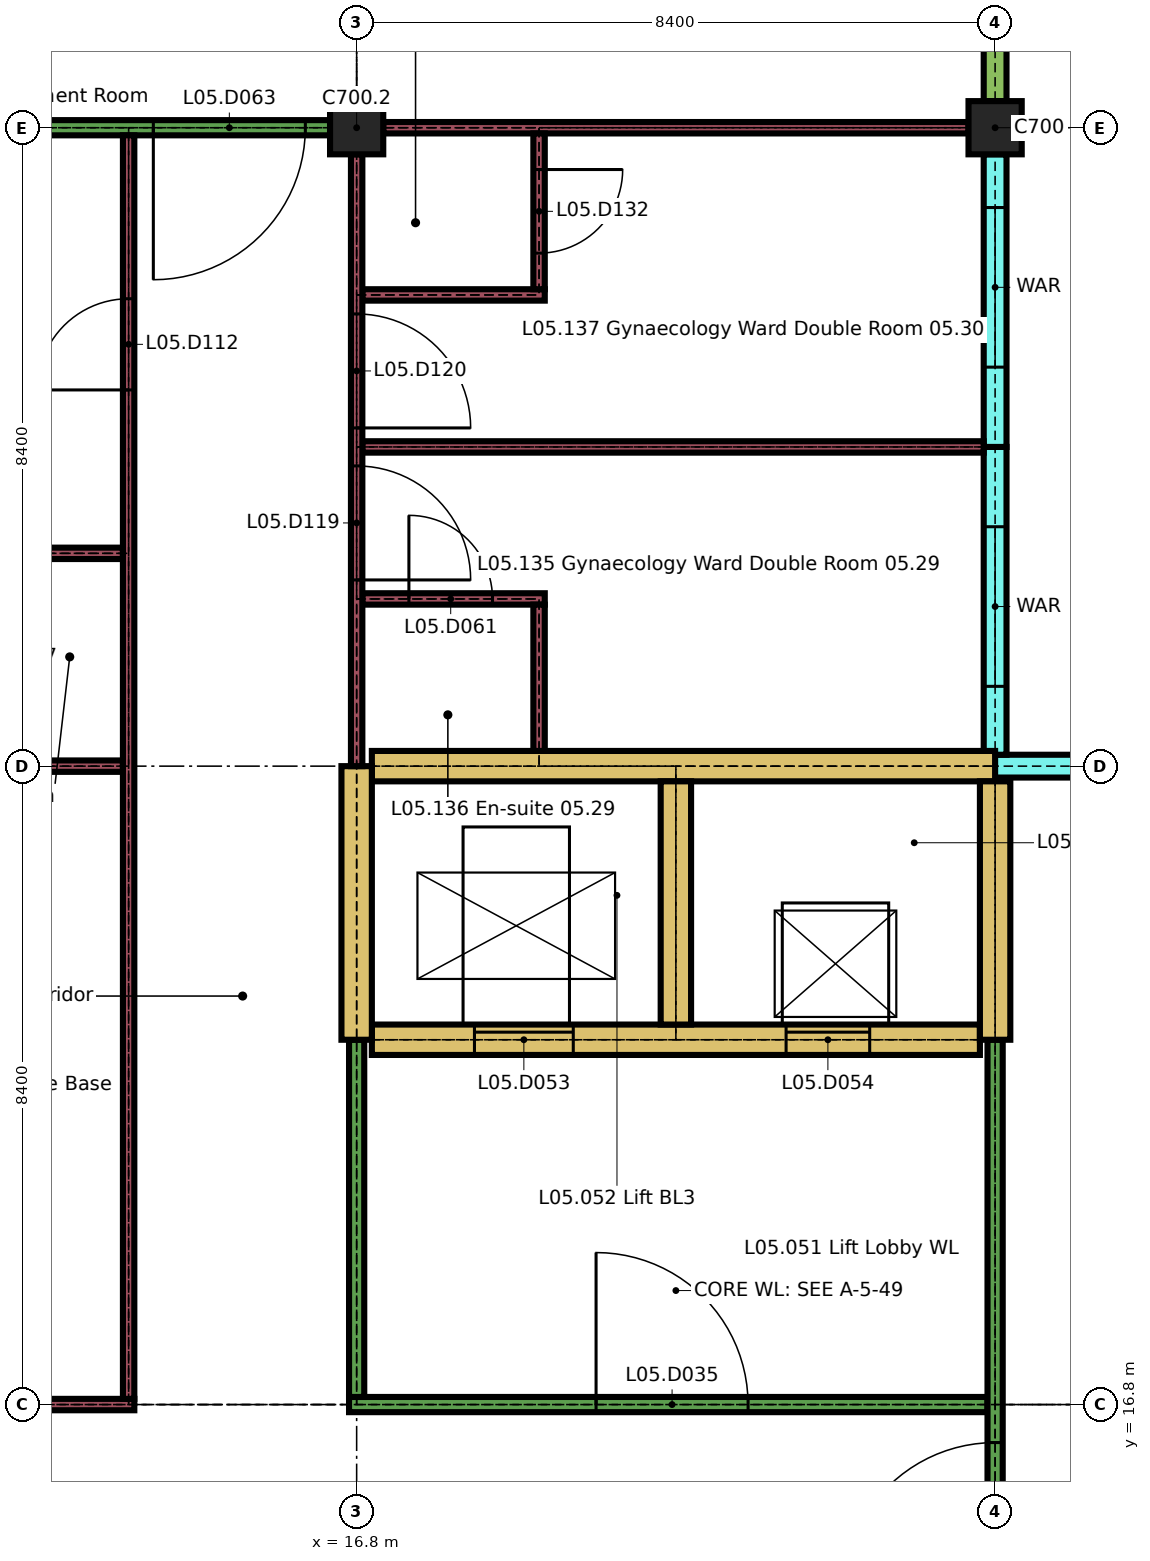
"""IFC4 building model, lengths in metres.
Left out: names, types, materials, properties, quantities, classifications, styles, units other than length and angle.
Written with IfcOpenShell. Run it as: python <this file> out.ifc"""

import sys

from ifc_helpers import new_model, si_unit, direction, frame, frame_2d, origin, origin_2d, place, context, subcontext, project, spatial, rectangle, extrude, element, fill, save


model = new_model("IFC4")
c1 = context("Model", 3, precision=1e-05, world=origin(), true_north=direction((0.0, 1.0)))
c2 = subcontext(c1, "Body", "Model", "MODEL_VIEW")
j1 = project(units=[si_unit("LENGTHUNIT", "METRE"), si_unit("PLANEANGLEUNIT", "RADIAN")], contexts=[c1])
p1 = place(None, origin())
s1 = spatial("IfcSite", under=j1, at=p1, CompositionType="ELEMENT")
p2 = place(p1, origin())
s2 = spatial("IfcBuilding", under=s1, at=p2, CompositionType="ELEMENT")
p3 = place(p2, frame((0.0, 0.0, 22.5)))
s3 = spatial("IfcBuildingStorey", under=s2, at=p3, CompositionType="ELEMENT", Elevation=22.5)
for number, where, z_axis, x_axis in (
    (1, (16.8, 33.6, 0.0), (0.0, 0.0, 1.0), (1.0, 0.0, 0.0)),
    (2, (25.2, 33.6, 0.0), (0.0, 0.0, 1.0), (1.0, 0.0, 0.0)),
):
    element("IfcColumn", number, at=place(p3, frame(where, z_axis=z_axis, x_axis=x_axis)), inside=s3, PredefinedType="COLUMN", context=c2, shape_type="SweptSolid", body=[
        extrude(rectangle(XDim=0.7, YDim=0.7, at=origin_2d()), origin(), (0.0, 0.0, 1.0), 3.26),
    ])
p4 = place(p3, frame((25.05, 25.2, 0.0), z_axis=(0.0, 0.0, 1.0), x_axis=(1.0, 0.0, 0.0)))
e3 = element("IfcWall", 3, at=p4, inside=s3, PredefinedType="SOLIDWALL", context=c2, shape_type="SweptSolid", body=[
    extrude(rectangle(XDim=1.45, YDim=0.3, at=frame_2d((0.725, 0.0))), origin(), (0.0, 0.0, 1.0), 3.26),
])
p5 = place(p3, frame((25.2, 25.35, 0.0), z_axis=(0.0, 0.0, 1.0), x_axis=(0.0, 1.0, 0.0)))
e4 = element("IfcWall", 4, at=p5, inside=s3, PredefinedType="SOLIDWALL", context=c2, shape_type="SweptSolid", body=[
    extrude(rectangle(XDim=4.05, YDim=0.3, at=frame_2d((2.025, 0.0))), origin(), (0.0, 0.0, 1.0), 3.26),
])
p6 = place(p5, frame((0.9, 0.0, 0.9)))
e5 = element("IfcOpeningElement", 5, at=p6, cuts=e4, PredefinedType="OPENING", context=c2, shape_type="SweptSolid", body=[
    extrude(rectangle(XDim=2.1, YDim=1.5, at=frame_2d((1.05, 0.75))), frame((0.0, 0.16, 0.0), z_axis=(0.0, -1.0, 0.0), x_axis=(1.0, 0.0, 0.0)), (0.0, 0.0, 1.0), 0.32),
])
p7 = place(p3, frame((25.2, 29.4, 0.0), z_axis=(0.0, 0.0, 1.0), x_axis=(0.0, 1.0, 0.0)))
e6 = element("IfcWall", 6, at=p7, inside=s3, PredefinedType="SOLIDWALL", context=c2, shape_type="SweptSolid", body=[
    extrude(rectangle(XDim=3.85, YDim=0.3, at=frame_2d((1.925, 0.0))), origin(), (0.0, 0.0, 1.0), 3.26),
])
p8 = place(p7, frame((1.05, 0.0, 0.9)))
e7 = element("IfcOpeningElement", 7, at=p8, cuts=e6, PredefinedType="OPENING", context=c2, shape_type="SweptSolid", body=[
    extrude(rectangle(XDim=2.1, YDim=1.5, at=frame_2d((1.05, 0.75))), frame((0.0, 0.16, 0.0), z_axis=(0.0, -1.0, 0.0), x_axis=(1.0, 0.0, 0.0)), (0.0, 0.0, 1.0), 0.32),
])
p9 = place(p3, frame((25.2, 33.95, 0.0), z_axis=(0.0, 0.0, 1.0), x_axis=(0.0, 1.0, 0.0)))
e8 = element("IfcWall", 8, at=p9, inside=s3, PredefinedType="SOLIDWALL", context=c2, shape_type="SweptSolid", body=[
    extrude(rectangle(XDim=1.15, YDim=0.3, at=frame_2d((0.575, 0.0))), origin(), (0.0, 0.0, 1.0), 2.96),
])
p10 = place(p3, frame((11.4, 16.8, 0.0), z_axis=(0.0, 0.0, 1.0), x_axis=(1.0, 0.0, 0.0)))
e9 = element("IfcWall", 9, at=p10, inside=s3, PredefinedType="PARTITIONING", context=c2, shape_type="SweptSolid", body=[
    extrude(rectangle(XDim=2.475, YDim=0.15, at=frame_2d((1.238, 0.0))), origin(), (0.0, 0.0, 1.0), 3.26),
])
p11 = place(p3, frame((16.7, 16.8, 0.0), z_axis=(0.0, 0.0, 1.0), x_axis=(1.0, 0.0, 0.0)))
e10 = element("IfcWall", 10, at=p11, inside=s3, PredefinedType="PARTITIONING", context=c2, shape_type="SweptSolid", body=[
    extrude(rectangle(XDim=8.4, YDim=0.2, at=frame_2d((4.2, 0.0))), origin(), (0.0, 0.0, 1.0), 3.26),
])
p12 = place(p11, frame((3.25, 0.0, 0.0)))
e11 = element("IfcOpeningElement", 11, at=p12, cuts=e10, PredefinedType="OPENING", context=c2, shape_type="SweptSolid", body=[
    extrude(rectangle(XDim=2.0, YDim=2.4, at=frame_2d((1.0, 1.2))), frame((0.0, 0.11, 0.0), z_axis=(0.0, -1.0, 0.0), x_axis=(1.0, 0.0, 0.0)), (0.0, 0.0, 1.0), 0.22),
])
p13 = place(p3, frame((17.0, 21.6, 0.0), z_axis=(0.0, 0.0, 1.0), x_axis=(1.0, 0.0, 0.0)))
e12 = element("IfcWall", 12, at=p13, inside=s3, PredefinedType="SHEAR", context=c2, shape_type="SweptSolid", body=[
    extrude(rectangle(XDim=8.0, YDim=0.4, at=frame_2d((4.0, 0.0))), origin(), (0.0, 0.0, 1.0), 3.26),
])
p14 = place(p13, frame((1.35, 0.0, 0.0)))
e13 = element("IfcOpeningElement", 13, at=p14, cuts=e12, PredefinedType="OPENING", context=c2, shape_type="SweptSolid", body=[
    extrude(rectangle(XDim=1.3, YDim=2.1, at=frame_2d((0.65, 1.05))), frame((0.0, 0.21, 0.0), z_axis=(0.0, -1.0, 0.0), x_axis=(1.0, 0.0, 0.0)), (0.0, 0.0, 1.0), 0.42),
])
p15 = place(p13, frame((5.45, 0.0, 0.0)))
e14 = element("IfcOpeningElement", 14, at=p15, cuts=e12, PredefinedType="OPENING", context=c2, shape_type="SweptSolid", body=[
    extrude(rectangle(XDim=1.1, YDim=2.1, at=frame_2d((0.55, 1.05))), frame((0.0, 0.21, 0.0), z_axis=(0.0, -1.0, 0.0), x_axis=(1.0, 0.0, 0.0)), (0.0, 0.0, 1.0), 0.42),
])
p16 = place(p3, frame((11.325, 25.2, 0.0), z_axis=(0.0, 0.0, 1.0), x_axis=(1.0, 0.0, 0.0)))
e15 = element("IfcWall", 15, at=p16, inside=s3, PredefinedType="PARTITIONING", context=c2, shape_type="SweptSolid", body=[
    extrude(rectangle(XDim=2.4, YDim=0.15, at=frame_2d((1.2, 0.0))), origin(), (0.0, 0.0, 1.0), 3.26),
])
p17 = place(p3, frame((17.0, 25.2, 0.0), z_axis=(0.0, 0.0, 1.0), x_axis=(1.0, 0.0, 0.0)))
e16 = element("IfcWall", 16, at=p17, inside=s3, PredefinedType="SHEAR", context=c2, shape_type="SweptSolid", body=[
    extrude(rectangle(XDim=8.2, YDim=0.4, at=frame_2d((4.1, 0.0))), origin(), (0.0, 0.0, 1.0), 3.26),
])
p18 = place(p3, frame((16.875, 27.4, 0.0), z_axis=(0.0, 0.0, 1.0), x_axis=(1.0, 0.0, 0.0)))
e17 = element("IfcWall", 17, at=p18, inside=s3, PredefinedType="PARTITIONING", context=c2, shape_type="SweptSolid", body=[
    extrude(rectangle(XDim=2.4, YDim=0.15, at=frame_2d((1.2, 0.0))), origin(), (0.0, 0.0, 1.0), 3.26),
])
p19 = place(p18, frame((0.613, 0.0, 0.0)))
e18 = element("IfcOpeningElement", 18, at=p19, cuts=e17, PredefinedType="OPENING", context=c2, shape_type="SweptSolid", body=[
    extrude(rectangle(XDim=1.1, YDim=2.1, at=frame_2d((0.55, 1.05))), frame((0.0, 0.085, 0.0), z_axis=(0.0, -1.0, 0.0), x_axis=(1.0, 0.0, 0.0)), (0.0, 0.0, 1.0), 0.17),
])
p20 = place(p3, frame((11.475, 28.0, 0.0), z_axis=(0.0, 0.0, 1.0), x_axis=(1.0, 0.0, 0.0)))
e19 = element("IfcWall", 19, at=p20, inside=s3, PredefinedType="PARTITIONING", context=c2, shape_type="SweptSolid", body=[
    extrude(rectangle(XDim=2.25, YDim=0.15, at=frame_2d((1.125, 0.0))), origin(), (0.0, 0.0, 1.0), 3.26),
])
p21 = place(p3, frame((16.875, 29.4, 0.0), z_axis=(0.0, 0.0, 1.0), x_axis=(1.0, 0.0, 0.0)))
e20 = element("IfcWall", 20, at=p21, inside=s3, PredefinedType="PARTITIONING", context=c2, shape_type="SweptSolid", body=[
    extrude(rectangle(XDim=8.175, YDim=0.15, at=frame_2d((4.087, 0.0))), origin(), (0.0, 0.0, 1.0), 3.26),
])
p22 = place(p3, frame((16.875, 31.4, 0.0), z_axis=(0.0, 0.0, 1.0), x_axis=(1.0, 0.0, 0.0)))
e21 = element("IfcWall", 21, at=p22, inside=s3, PredefinedType="PARTITIONING", context=c2, shape_type="SweptSolid", body=[
    extrude(rectangle(XDim=2.4, YDim=0.15, at=frame_2d((1.2, 0.0))), origin(), (0.0, 0.0, 1.0), 3.26),
])
p23 = place(p3, frame((8.75, 33.6, 0.0), z_axis=(0.0, 0.0, 1.0), x_axis=(1.0, 0.0, 0.0)))
e22 = element("IfcWall", 22, at=p23, inside=s3, PredefinedType="PARTITIONING", context=c2, shape_type="SweptSolid", body=[
    extrude(rectangle(XDim=7.7, YDim=0.2, at=frame_2d((3.85, 0.0))), origin(), (0.0, 0.0, 1.0), 3.26),
])
p24 = place(p23, frame((0.325, 0.0, 0.0)))
e23 = element("IfcOpeningElement", 23, at=p24, cuts=e22, PredefinedType="OPENING", context=c2, shape_type="SweptSolid", body=[
    extrude(rectangle(XDim=2.0, YDim=2.4, at=frame_2d((1.0, 1.2))), frame((0.0, 0.11, 0.0), z_axis=(0.0, -1.0, 0.0), x_axis=(1.0, 0.0, 0.0)), (0.0, 0.0, 1.0), 0.22),
])
p25 = place(p23, frame((5.375, 0.0, 0.0)))
e24 = element("IfcOpeningElement", 24, at=p25, cuts=e22, PredefinedType="OPENING", context=c2, shape_type="SweptSolid", body=[
    extrude(rectangle(XDim=2.0, YDim=2.4, at=frame_2d((1.0, 1.2))), frame((0.0, 0.11, 0.0), z_axis=(0.0, -1.0, 0.0), x_axis=(1.0, 0.0, 0.0)), (0.0, 0.0, 1.0), 0.22),
])
p26 = place(p3, frame((17.15, 33.6, 0.0), z_axis=(0.0, 0.0, 1.0), x_axis=(1.0, 0.0, 0.0)))
e25 = element("IfcWall", 25, at=p26, inside=s3, PredefinedType="PARTITIONING", context=c2, shape_type="SweptSolid", body=[
    extrude(rectangle(XDim=7.7, YDim=0.15, at=frame_2d((3.85, 0.0))), origin(), (0.0, 0.0, 1.0), 3.26),
])
p27 = place(p3, frame((13.8, 16.875, 0.0), z_axis=(0.0, 0.0, 1.0), x_axis=(0.0, 1.0, 0.0)))
e26 = element("IfcWall", 26, at=p27, inside=s3, PredefinedType="PARTITIONING", context=c2, shape_type="SweptSolid", body=[
    extrude(rectangle(XDim=16.625, YDim=0.15, at=frame_2d((8.312, 0.0))), origin(), (0.0, 0.0, 1.0), 3.26),
])
p28 = place(p27, frame((13.275, 0.0, 0.0)))
e27 = element("IfcOpeningElement", 27, at=p28, cuts=e26, PredefinedType="OPENING", context=c2, shape_type="SweptSolid", body=[
    extrude(rectangle(XDim=1.2, YDim=2.1, at=frame_2d((0.6, 1.05))), frame((0.0, 0.085, 0.0), z_axis=(0.0, -1.0, 0.0), x_axis=(1.0, 0.0, 0.0)), (0.0, 0.0, 1.0), 0.17),
])
p29 = place(p3, frame((16.8, 16.9, 0.0), z_axis=(0.0, 0.0, 1.0), x_axis=(0.0, 1.0, 0.0)))
e28 = element("IfcWall", 28, at=p29, inside=s3, PredefinedType="PARTITIONING", context=c2, shape_type="SweptSolid", body=[
    extrude(rectangle(XDim=4.7, YDim=0.2, at=frame_2d((2.35, 0.0))), origin(), (0.0, 0.0, 1.0), 3.26),
])
p30 = place(p3, frame((16.8, 21.6, 0.0), z_axis=(0.0, 0.0, 1.0), x_axis=(0.0, 1.0, 0.0)))
e29 = element("IfcWall", 29, at=p30, inside=s3, PredefinedType="SHEAR", context=c2, shape_type="SweptSolid", body=[
    extrude(rectangle(XDim=3.6, YDim=0.4, at=frame_2d((1.8, 0.0))), origin(), (0.0, 0.0, 1.0), 3.26),
])
p31 = place(p3, frame((16.8, 25.2, 0.0), z_axis=(0.0, 0.0, 1.0), x_axis=(0.0, 1.0, 0.0)))
e30 = element("IfcWall", 30, at=p31, inside=s3, PredefinedType="PARTITIONING", context=c2, shape_type="SweptSolid", body=[
    extrude(rectangle(XDim=8.05, YDim=0.15, at=frame_2d((4.025, 0.0))), origin(), (0.0, 0.0, 1.0), 3.26),
])
p32 = place(p31, frame((2.45, 0.0, 0.0)))
e31 = element("IfcOpeningElement", 31, at=p32, cuts=e30, PredefinedType="OPENING", context=c2, shape_type="SweptSolid", body=[
    extrude(rectangle(XDim=1.5, YDim=2.4, at=frame_2d((0.75, 1.2))), frame((0.0, 0.085, 0.0), z_axis=(0.0, -1.0, 0.0), x_axis=(1.0, 0.0, 0.0)), (0.0, 0.0, 1.0), 0.17),
])
p33 = place(p31, frame((4.45, 0.0, 0.0)))
e32 = element("IfcOpeningElement", 32, at=p33, cuts=e30, PredefinedType="OPENING", context=c2, shape_type="SweptSolid", body=[
    extrude(rectangle(XDim=1.5, YDim=2.4, at=frame_2d((0.75, 1.2))), frame((0.0, 0.085, 0.0), z_axis=(0.0, -1.0, 0.0), x_axis=(1.0, 0.0, 0.0)), (0.0, 0.0, 1.0), 0.17),
])
p34 = place(p3, frame((19.2, 25.4, 0.0), z_axis=(0.0, 0.0, 1.0), x_axis=(0.0, 1.0, 0.0)))
e33 = element("IfcWall", 33, at=p34, inside=s3, PredefinedType="PARTITIONING", context=c2, shape_type="SweptSolid", body=[
    extrude(rectangle(XDim=1.925, YDim=0.15, at=frame_2d((0.962, 0.0))), origin(), (0.0, 0.0, 1.0), 3.26),
])
p35 = place(p3, frame((19.2, 31.475, 0.0), z_axis=(0.0, 0.0, 1.0), x_axis=(0.0, 1.0, 0.0)))
e34 = element("IfcWall", 34, at=p35, inside=s3, PredefinedType="PARTITIONING", context=c2, shape_type="SweptSolid", body=[
    extrude(rectangle(XDim=2.05, YDim=0.15, at=frame_2d((1.025, 0.0))), origin(), (0.0, 0.0, 1.0), 3.26),
])
p36 = place(p35, frame((0.475, 0.0, 0.0)))
e35 = element("IfcOpeningElement", 35, at=p36, cuts=e34, PredefinedType="OPENING", context=c2, shape_type="SweptSolid", body=[
    extrude(rectangle(XDim=1.1, YDim=2.1, at=frame_2d((0.55, 1.05))), frame((0.0, 0.085, 0.0), z_axis=(0.0, -1.0, 0.0), x_axis=(1.0, 0.0, 0.0)), (0.0, 0.0, 1.0), 0.17),
])
p37 = place(p3, frame((21.0, 21.8, 0.0), z_axis=(0.0, 0.0, 1.0), x_axis=(0.0, 1.0, 0.0)))
e36 = element("IfcWall", 36, at=p37, inside=s3, PredefinedType="SHEAR", context=c2, shape_type="SweptSolid", body=[
    extrude(rectangle(XDim=3.2, YDim=0.4, at=frame_2d((1.6, 0.0))), origin(), (0.0, 0.0, 1.0), 3.26),
])
p38 = place(p3, frame((25.2, 8.75, 0.0), z_axis=(0.0, 0.0, 1.0), x_axis=(0.0, 1.0, 0.0)))
e37 = element("IfcWall", 37, at=p38, inside=s3, PredefinedType="PARTITIONING", context=c2, shape_type="SweptSolid", body=[
    extrude(rectangle(XDim=12.85, YDim=0.2, at=frame_2d((6.425, 0.0))), origin(), (0.0, 0.0, 1.0), 3.26),
])
p39 = place(p38, frame((0.325, 0.0, 0.0)))
e38 = element("IfcOpeningElement", 38, at=p39, cuts=e37, PredefinedType="OPENING", context=c2, shape_type="SweptSolid", body=[
    extrude(rectangle(XDim=2.0, YDim=2.4, at=frame_2d((1.0, 1.2))), frame((0.0, 0.11, 0.0), z_axis=(0.0, -1.0, 0.0), x_axis=(1.0, 0.0, 0.0)), (0.0, 0.0, 1.0), 0.22),
])
p40 = place(p38, frame((5.55, 0.0, 0.0)))
e39 = element("IfcOpeningElement", 39, at=p40, cuts=e37, PredefinedType="OPENING", context=c2, shape_type="SweptSolid", body=[
    extrude(rectangle(XDim=2.0, YDim=2.4, at=frame_2d((1.0, 1.2))), frame((0.0, 0.11, 0.0), z_axis=(0.0, -1.0, 0.0), x_axis=(1.0, 0.0, 0.0)), (0.0, 0.0, 1.0), 0.22),
])
p41 = place(p3, frame((25.2, 21.6, 0.0), z_axis=(0.0, 0.0, 1.0), x_axis=(0.0, 1.0, 0.0)))
e40 = element("IfcWall", 40, at=p41, inside=s3, PredefinedType="SHEAR", context=c2, shape_type="SweptSolid", body=[
    extrude(rectangle(XDim=3.4, YDim=0.4, at=frame_2d((1.7, 0.0))), origin(), (0.0, 0.0, 1.0), 3.26),
])
p42 = place(p6, origin())
e41 = element("IfcWindow", 41, at=p42, inside=s3, PartitioningType="DOUBLE_PANEL_VERTICAL", PredefinedType="WINDOW", context=c2, shape_type="SweptSolid", body=[
    extrude(rectangle(XDim=2.1, YDim=1.5, at=frame_2d((1.05, 0.75))), frame((0.0, 0.05, 0.0), z_axis=(0.0, -1.0, 0.0), x_axis=(1.0, 0.0, 0.0)), (0.0, 0.0, 1.0), 0.1),
])
fill(e5, e41)
p43 = place(p8, origin())
e42 = element("IfcWindow", 42, at=p43, inside=s3, PartitioningType="DOUBLE_PANEL_VERTICAL", PredefinedType="WINDOW", context=c2, shape_type="SweptSolid", body=[
    extrude(rectangle(XDim=2.1, YDim=1.5, at=frame_2d((1.05, 0.75))), frame((0.0, 0.05, 0.0), z_axis=(0.0, -1.0, 0.0), x_axis=(1.0, 0.0, 0.0)), (0.0, 0.0, 1.0), 0.1),
])
fill(e7, e42)
p44 = place(p12, origin())
e43 = element("IfcDoor", 43, at=p44, inside=s3, OperationType="SINGLE_SWING_RIGHT", PredefinedType="DOOR", context=c2, shape_type="SweptSolid", body=[
    extrude(rectangle(XDim=2.0, YDim=2.4, at=frame_2d((1.0, 1.2))), frame((0.0, 0.03, 0.0), z_axis=(0.0, -1.0, 0.0), x_axis=(1.0, 0.0, 0.0)), (0.0, 0.0, 1.0), 0.06),
])
fill(e11, e43)
p45 = place(p14, origin())
e44 = element("IfcDoor", 44, at=p45, inside=s3, OperationType="SLIDING_TO_LEFT", PredefinedType="DOOR", context=c2, shape_type="SweptSolid", body=[
    extrude(rectangle(XDim=1.3, YDim=2.1, at=frame_2d((0.65, 1.05))), frame((0.0, 0.025, 0.0), z_axis=(0.0, -1.0, 0.0), x_axis=(1.0, 0.0, 0.0)), (0.0, 0.0, 1.0), 0.05),
])
fill(e13, e44)
p46 = place(p15, origin())
e45 = element("IfcDoor", 45, at=p46, inside=s3, OperationType="SLIDING_TO_LEFT", PredefinedType="DOOR", context=c2, shape_type="SweptSolid", body=[
    extrude(rectangle(XDim=1.1, YDim=2.1, at=frame_2d((0.55, 1.05))), frame((0.0, 0.025, 0.0), z_axis=(0.0, -1.0, 0.0), x_axis=(1.0, 0.0, 0.0)), (0.0, 0.0, 1.0), 0.05),
])
fill(e14, e45)
p47 = place(p19, origin())
e46 = element("IfcDoor", 46, at=p47, inside=s3, OperationType="SINGLE_SWING_RIGHT", PredefinedType="DOOR", context=c2, shape_type="SweptSolid", body=[
    extrude(rectangle(XDim=1.1, YDim=2.1, at=frame_2d((0.55, 1.05))), frame((0.0, 0.025, 0.0), z_axis=(0.0, -1.0, 0.0), x_axis=(1.0, 0.0, 0.0)), (0.0, 0.0, 1.0), 0.05),
])
fill(e18, e46)
p48 = place(p25, origin())
e47 = element("IfcDoor", 47, at=p48, inside=s3, OperationType="SINGLE_SWING_LEFT", PredefinedType="DOOR", context=c2, shape_type="SweptSolid", body=[
    extrude(rectangle(XDim=2.0, YDim=2.4, at=frame_2d((1.0, 1.2))), frame((0.0, 0.03, 0.0), z_axis=(0.0, -1.0, 0.0), x_axis=(1.0, 0.0, 0.0)), (0.0, 0.0, 1.0), 0.06),
])
fill(e24, e47)
p49 = place(p28, origin())
e48 = element("IfcDoor", 48, at=p49, inside=s3, OperationType="SINGLE_SWING_RIGHT", PredefinedType="DOOR", context=c2, shape_type="SweptSolid", body=[
    extrude(rectangle(XDim=1.2, YDim=2.1, at=frame_2d((0.6, 1.05))), frame((0.0, 0.025, 0.0), z_axis=(0.0, -1.0, 0.0), x_axis=(1.0, 0.0, 0.0)), (0.0, 0.0, 1.0), 0.05),
])
fill(e27, e48)
p50 = place(p32, origin())
e49 = element("IfcDoor", 49, at=p50, inside=s3, OperationType="SINGLE_SWING_LEFT", PredefinedType="DOOR", context=c2, shape_type="SweptSolid", body=[
    extrude(rectangle(XDim=1.5, YDim=2.4, at=frame_2d((0.75, 1.2))), frame((0.0, 0.03, 0.0), z_axis=(0.0, -1.0, 0.0), x_axis=(1.0, 0.0, 0.0)), (0.0, 0.0, 1.0), 0.06),
])
fill(e31, e49)
p51 = place(p33, origin())
e50 = element("IfcDoor", 50, at=p51, inside=s3, OperationType="SINGLE_SWING_LEFT", PredefinedType="DOOR", context=c2, shape_type="SweptSolid", body=[
    extrude(rectangle(XDim=1.5, YDim=2.4, at=frame_2d((0.75, 1.2))), frame((0.0, 0.03, 0.0), z_axis=(0.0, -1.0, 0.0), x_axis=(1.0, 0.0, 0.0)), (0.0, 0.0, 1.0), 0.06),
])
fill(e32, e50)
p52 = place(p36, origin())
e51 = element("IfcDoor", 51, at=p52, inside=s3, OperationType="SINGLE_SWING_RIGHT", PredefinedType="DOOR", context=c2, shape_type="SweptSolid", body=[
    extrude(rectangle(XDim=1.1, YDim=2.1, at=frame_2d((0.55, 1.05))), frame((0.0, 0.025, 0.0), z_axis=(0.0, -1.0, 0.0), x_axis=(1.0, 0.0, 0.0)), (0.0, 0.0, 1.0), 0.05),
])
fill(e35, e51)
p53 = place(p40, origin())
e52 = element("IfcDoor", 52, at=p53, inside=s3, OperationType="SINGLE_SWING_RIGHT", PredefinedType="DOOR", context=c2, shape_type="SweptSolid", body=[
    extrude(rectangle(XDim=2.0, YDim=2.4, at=frame_2d((1.0, 1.2))), frame((0.0, 0.03, 0.0), z_axis=(0.0, -1.0, 0.0), x_axis=(1.0, 0.0, 0.0)), (0.0, 0.0, 1.0), 0.06),
])
fill(e39, e52)
save(model, sys.argv[1])
